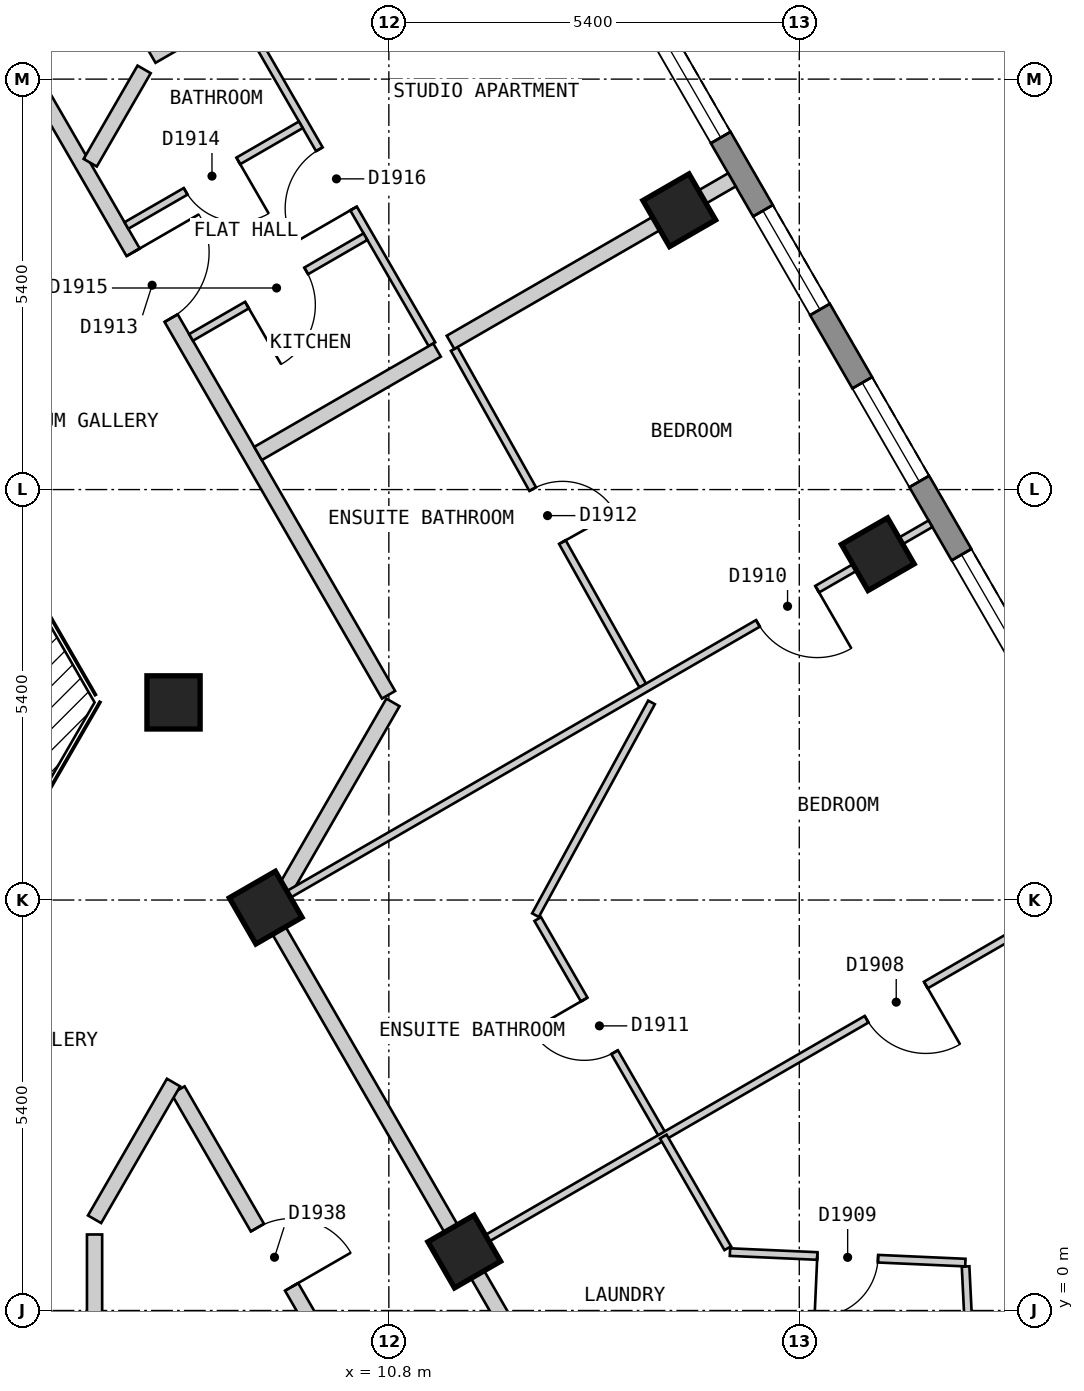
"""IFC4 building model, lengths in metres.
Left out: names, types, materials, properties, quantities, classifications, styles, units other than length and angle.
Written with IfcOpenShell. Run it as: python <this file> out.ifc"""

import sys

from ifc_helpers import new_model, si_unit, direction, frame, frame_2d, origin, origin_2d, place, context, subcontext, project, spatial, polyline, rectangle, outline, extrude, element, fill, save


model = new_model("IFC4")
c1 = context("Model", 3, precision=1e-05, world=origin(), true_north=direction((0.0, 1.0)))
c2 = subcontext(c1, "Body", "Model", "MODEL_VIEW")
j1 = project(units=[si_unit("LENGTHUNIT", "METRE"), si_unit("PLANEANGLEUNIT", "RADIAN")], contexts=[c1])
p1 = place(None, origin())
s1 = spatial("IfcSite", under=j1, at=p1, CompositionType="ELEMENT")
p2 = place(p1, origin())
s2 = spatial("IfcBuilding", under=s1, at=p2, CompositionType="ELEMENT")
p3 = place(p2, frame((0.0, 0.0, 220.8)))
s3 = spatial("IfcBuildingStorey", under=s2, at=p3, CompositionType="ELEMENT", Elevation=220.8)
for number, where, z_axis, x_axis in (
    (1, (17.233, 9.95, 0.0), (0.0, 0.0, 1.0), (-0.5, 0.866, 0.0)),
    (2, (14.621, 14.475, 0.0), (0.0, 0.0, 1.0), (-0.5, 0.866, 0.0)),
    (3, (11.792, 0.775, 0.0), (0.0, 0.0, 1.0), (-0.5, 0.866, 0.0)),
    (4, (9.179, 5.3, 0.0), (0.0, 0.0, 1.0), (-0.5, 0.866, 0.0)),
    (5, (7.967, 8.0, 0.0), (0.0, 0.0, 1.0), (1.0, 0.0, 0.0)),
):
    element("IfcColumn", number, at=place(p3, frame(where, z_axis=z_axis, x_axis=x_axis)), inside=s3, PredefinedType="COLUMN", context=c2, shape_type="SweptSolid", body=[
        extrude(rectangle(XDim=0.7, YDim=0.7, at=origin_2d()), origin(), (0.0, 0.0, 1.0), 3.0),
    ])
p4 = place(p3, frame((23.599, 0.825, 0.0), z_axis=(0.0, 0.0, 1.0), x_axis=(-0.500003656944, 0.866023292436, 0.0)))
e6 = element("IfcWall", 6, at=p4, inside=s3, PredefinedType="SOLIDWALL", context=c2, shape_type="SweptSolid", body=[
    extrude(outline(polyline([(0.0, -0.15), (22.17, -0.15), (22.09, 0.15), (0.08, 0.15), (0.0, -0.15)])), origin(), (0.0, 0.0, 1.0), 2.7),
])
p5 = place(p4, frame((1.191, 0.0, 0.15)))
e7 = element("IfcOpeningElement", 7, at=p5, cuts=e6, PredefinedType="OPENING", context=c2, shape_type="SweptSolid", body=[
    extrude(rectangle(XDim=1.5, YDim=2.1, at=frame_2d((0.75, 1.05))), frame((0.0, 0.16, 0.0), z_axis=(0.0, -1.0, 0.0), x_axis=(1.0, 0.0, 0.0)), (0.0, 0.0, 1.0), 0.32),
])
p6 = place(p4, frame((3.804, 0.0, 0.15)))
e8 = element("IfcOpeningElement", 8, at=p6, cuts=e6, PredefinedType="OPENING", context=c2, shape_type="SweptSolid", body=[
    extrude(rectangle(XDim=1.5, YDim=2.1, at=frame_2d((0.75, 1.05))), frame((0.0, 0.16, 0.0), z_axis=(0.0, -1.0, 0.0), x_axis=(1.0, 0.0, 0.0)), (0.0, 0.0, 1.0), 0.32),
])
p7 = place(p4, frame((6.417, 0.0, 0.15)))
e9 = element("IfcOpeningElement", 9, at=p7, cuts=e6, PredefinedType="OPENING", context=c2, shape_type="SweptSolid", body=[
    extrude(rectangle(XDim=1.5, YDim=2.1, at=frame_2d((0.75, 1.05))), frame((0.0, 0.16, 0.0), z_axis=(0.0, -1.0, 0.0), x_axis=(1.0, 0.0, 0.0)), (0.0, 0.0, 1.0), 0.32),
])
p8 = place(p4, frame((9.029, 0.0, 0.15)))
e10 = element("IfcOpeningElement", 10, at=p8, cuts=e6, PredefinedType="OPENING", context=c2, shape_type="SweptSolid", body=[
    extrude(rectangle(XDim=1.5, YDim=2.1, at=frame_2d((0.75, 1.05))), frame((0.0, 0.16, 0.0), z_axis=(0.0, -1.0, 0.0), x_axis=(1.0, 0.0, 0.0)), (0.0, 0.0, 1.0), 0.32),
])
p9 = place(p4, frame((11.641, 0.0, 0.15)))
e11 = element("IfcOpeningElement", 11, at=p9, cuts=e6, PredefinedType="OPENING", context=c2, shape_type="SweptSolid", body=[
    extrude(rectangle(XDim=1.5, YDim=2.1, at=frame_2d((0.75, 1.05))), frame((0.0, 0.16, 0.0), z_axis=(0.0, -1.0, 0.0), x_axis=(1.0, 0.0, 0.0)), (0.0, 0.0, 1.0), 0.32),
])
p10 = place(p4, frame((14.254, 0.0, 0.15)))
e12 = element("IfcOpeningElement", 12, at=p10, cuts=e6, PredefinedType="OPENING", context=c2, shape_type="SweptSolid", body=[
    extrude(rectangle(XDim=1.5, YDim=2.1, at=frame_2d((0.75, 1.05))), frame((0.0, 0.16, 0.0), z_axis=(0.0, -1.0, 0.0), x_axis=(1.0, 0.0, 0.0)), (0.0, 0.0, 1.0), 0.32),
])
p11 = place(p4, frame((16.866, 0.0, 0.15)))
e13 = element("IfcOpeningElement", 13, at=p11, cuts=e6, PredefinedType="OPENING", context=c2, shape_type="SweptSolid", body=[
    extrude(rectangle(XDim=1.5, YDim=2.1, at=frame_2d((0.75, 1.05))), frame((0.0, 0.16, 0.0), z_axis=(0.0, -1.0, 0.0), x_axis=(1.0, 0.0, 0.0)), (0.0, 0.0, 1.0), 0.32),
])
p12 = place(p4, frame((19.479, 0.0, 0.15)))
e14 = element("IfcOpeningElement", 14, at=p12, cuts=e6, PredefinedType="OPENING", context=c2, shape_type="SweptSolid", body=[
    extrude(rectangle(XDim=1.5, YDim=2.1, at=frame_2d((0.75, 1.05))), frame((0.0, 0.16, 0.0), z_axis=(0.0, -1.0, 0.0), x_axis=(1.0, 0.0, 0.0)), (0.0, 0.0, 1.0), 0.32),
])
p13 = place(p3, frame((8.026, 2.899, 0.0), z_axis=(0.0, 0.0, 1.0), x_axis=(0.499986018985, -0.866033475577, 0.0)))
e15 = element("IfcWall", 15, at=p13, inside=s3, PredefinedType="PARTITIONING", context=c2, shape_type="SweptSolid", body=[
    extrude(rectangle(XDim=5.078, YDim=0.2, at=frame_2d((2.539, 0.0))), origin(), (0.0, 0.0, 1.0), 2.7),
])
p14 = place(p13, frame((2.089, 0.0, 0.0)))
e16 = element("IfcOpeningElement", 16, at=p14, cuts=e15, PredefinedType="OPENING", context=c2, shape_type="SweptSolid", body=[
    extrude(rectangle(XDim=0.9, YDim=2.1, at=frame_2d((0.45, 1.05))), frame((0.0, 0.11, 0.0), z_axis=(0.0, -1.0, 0.0), x_axis=(1.0, 0.0, 0.0)), (0.0, 0.0, 1.0), 0.22),
])
p15 = place(p3, frame((9.238, 5.2, 0.0), z_axis=(0.0, 0.0, 1.0), x_axis=(0.500025705601, -0.86601056214, 0.0)))
e17 = element("IfcWall", 17, at=p15, inside=s3, PredefinedType="PARTITIONING", context=c2, shape_type="SweptSolid", body=[
    extrude(rectangle(XDim=7.735, YDim=0.2, at=frame_2d((3.868, 0.0))), origin(), (0.0, 0.0, 1.0), 2.7),
])
p16 = place(p3, frame((5.485, 17.3, 0.0), z_axis=(0.0, 0.0, 1.0), x_axis=(0.499943285704, -0.866058145322, 0.0)))
e18 = element("IfcWall", 18, at=p16, inside=s3, PredefinedType="PARTITIONING", context=c2, shape_type="SweptSolid", body=[
    extrude(rectangle(XDim=10.623, YDim=0.2, at=frame_2d((5.312, 0.0))), origin(), (0.0, 0.0, 1.0), 2.7),
])
p17 = place(p16, frame((3.901, 0.0, 0.0)))
e19 = element("IfcOpeningElement", 19, at=p17, cuts=e18, PredefinedType="OPENING", context=c2, shape_type="SweptSolid", body=[
    extrude(rectangle(XDim=1.0, YDim=2.1, at=frame_2d((0.5, 1.05))), frame((0.0, 0.11, 0.0), z_axis=(0.0, -1.0, 0.0), x_axis=(1.0, 0.0, 0.0)), (0.0, 0.0, 1.0), 0.22),
])
p18 = place(p3, frame((6.928, 1.0, 0.0), z_axis=(0.0, 0.0, 1.0), x_axis=(0.0, -1.0, 0.0)))
e20 = element("IfcWall", 20, at=p18, inside=s3, PredefinedType="PARTITIONING", context=c2, shape_type="SweptSolid", body=[
    extrude(rectangle(XDim=3.699, YDim=0.2, at=frame_2d((1.85, 0.0))), origin(), (0.0, 0.0, 1.0), 2.7),
])
p19 = place(p3, frame((6.928, 1.2, 0.0), z_axis=(0.0, 0.0, 1.0), x_axis=(0.500132712588, 0.865948768577, 0.0)))
e21 = element("IfcWall", 21, at=p19, inside=s3, PredefinedType="PARTITIONING", context=c2, shape_type="SweptSolid", body=[
    extrude(rectangle(XDim=2.078, YDim=0.2, at=frame_2d((1.039, 0.0))), origin(), (0.0, 0.0, 1.0), 2.7),
])
p20 = place(p3, frame((9.404, 5.487, 0.0), z_axis=(0.0, 0.0, 1.0), x_axis=(0.499768590677, 0.866158966803, 0.0)))
e22 = element("IfcWall", 22, at=p20, inside=s3, PredefinedType="PARTITIONING", context=c2, shape_type="SweptSolid", body=[
    extrude(rectangle(XDim=2.901, YDim=0.2, at=frame_2d((1.451, 0.0))), origin(), (0.0, 0.0, 1.0), 2.7),
])
p21 = place(p3, frame((12.759, 5.15, 0.0), z_axis=(0.0, 0.0, 1.0), x_axis=(0.499905801698, -0.866079782369, 0.0)))
e23 = element("IfcWall", 23, at=p21, inside=s3, PredefinedType="PARTITIONING", context=c2, shape_type="SweptSolid", body=[
    extrude(rectangle(XDim=3.304, YDim=0.1, at=frame_2d((1.652, 0.0))), origin(), (0.0, 0.0, 1.0), 2.7),
])
p22 = place(p21, frame((1.223, 0.0, 0.0)))
e24 = element("IfcOpeningElement", 24, at=p22, cuts=e23, PredefinedType="OPENING", context=c2, shape_type="SweptSolid", body=[
    extrude(rectangle(XDim=0.8, YDim=2.1, at=frame_2d((0.4, 1.05))), frame((0.0, 0.06, 0.0), z_axis=(0.0, -1.0, 0.0), x_axis=(1.0, 0.0, 0.0)), (0.0, 0.0, 1.0), 0.12),
])
p23 = place(p3, frame((8.854, 17.064, 0.0), z_axis=(0.0, 0.0, 1.0), x_axis=(0.500042049778, -0.866001124973, 0.0)))
e25 = element("IfcWall", 25, at=p23, inside=s3, PredefinedType="PARTITIONING", context=c2, shape_type="SweptSolid", body=[
    extrude(rectangle(XDim=5.025, YDim=0.1, at=frame_2d((2.513, 0.0))), origin(), (0.0, 0.0, 1.0), 2.7),
])
p24 = place(p23, frame((2.063, 0.0, 0.0)))
e26 = element("IfcOpeningElement", 26, at=p24, cuts=e25, PredefinedType="OPENING", context=c2, shape_type="SweptSolid", body=[
    extrude(rectangle(XDim=0.9, YDim=2.1, at=frame_2d((0.45, 1.05))), frame((0.0, 0.06, 0.0), z_axis=(0.0, -1.0, 0.0), x_axis=(1.0, 0.0, 0.0)), (0.0, 0.0, 1.0), 0.12),
])
p25 = place(p3, frame((11.66, 12.65, 0.0), z_axis=(0.0, 0.0, 1.0), x_axis=(0.488650242737, -0.872479764965, 0.0)))
e27 = element("IfcWall", 27, at=p25, inside=s3, PredefinedType="PARTITIONING", context=c2, shape_type="SweptSolid", body=[
    extrude(rectangle(XDim=5.075, YDim=0.1, at=frame_2d((2.538, 0.0))), origin(), (0.0, 0.0, 1.0), 2.7),
])
p26 = place(p25, frame((2.113, 0.0, 0.0)))
e28 = element("IfcOpeningElement", 28, at=p26, cuts=e27, PredefinedType="OPENING", context=c2, shape_type="SweptSolid", body=[
    extrude(rectangle(XDim=0.8, YDim=2.1, at=frame_2d((0.4, 1.05))), frame((0.0, 0.06, 0.0), z_axis=(0.0, -1.0, 0.0), x_axis=(1.0, 0.0, 0.0)), (0.0, 0.0, 1.0), 0.12),
])
p27 = place(p3, frame((18.388, 0.579, 0.0), z_axis=(0.0, 0.0, 1.0), x_axis=(0.049097293833, -0.998794000652, 0.0)))
e29 = element("IfcWall", 29, at=p27, inside=s3, PredefinedType="PARTITIONING", context=c2, shape_type="SweptSolid", body=[
    extrude(rectangle(XDim=2.362, YDim=0.1, at=frame_2d((1.181, 0.0))), origin(), (0.0, 0.0, 1.0), 2.7),
])
p28 = place(p3, frame((15.288, 0.768, 0.0), z_axis=(0.0, 0.0, 1.0), x_axis=(0.999006028269, -0.044575278833, 0.0)))
e30 = element("IfcWall", 30, at=p28, inside=s3, PredefinedType="PARTITIONING", context=c2, shape_type="SweptSolid", body=[
    extrude(rectangle(XDim=3.1, YDim=0.1, at=frame_2d((1.55, 0.0))), origin(), (0.0, 0.0, 1.0), 2.7),
])
p29 = place(p28, frame((1.15, 0.0, 0.0)))
e31 = element("IfcOpeningElement", 31, at=p29, cuts=e30, PredefinedType="OPENING", context=c2, shape_type="SweptSolid", body=[
    extrude(rectangle(XDim=0.8, YDim=2.1, at=frame_2d((0.4, 1.05))), frame((0.0, 0.06, 0.0), z_axis=(0.0, -1.0, 0.0), x_axis=(1.0, 0.0, 0.0)), (0.0, 0.0, 1.0), 0.12),
])
p30 = place(p3, frame((12.729, 5.201, 0.0), z_axis=(0.0, 0.0, 1.0), x_axis=(0.478932598182, 0.877851676764, 0.0)))
e32 = element("IfcWall", 32, at=p30, inside=s3, PredefinedType="PARTITIONING", context=c2, shape_type="SweptSolid", body=[
    extrude(rectangle(XDim=3.188, YDim=0.1, at=frame_2d((1.594, 0.0))), origin(), (0.0, 0.0, 1.0), 2.7),
])
p31 = place(p3, frame((11.879, 0.826, 0.0), z_axis=(0.0, 0.0, 1.0), x_axis=(0.866065245018, 0.499930986609, 0.0)))
e33 = element("IfcWall", 33, at=p31, inside=s3, PredefinedType="PARTITIONING", context=c2, shape_type="SweptSolid", body=[
    extrude(rectangle(XDim=10.0, YDim=0.1, at=frame_2d((5.0, 0.0))), origin(), (0.0, 0.0, 1.0), 2.7),
])
p32 = place(p31, frame((6.012, 0.0, 0.0)))
e34 = element("IfcOpeningElement", 34, at=p32, cuts=e33, PredefinedType="OPENING", context=c2, shape_type="SweptSolid", body=[
    extrude(rectangle(XDim=0.9, YDim=2.1, at=frame_2d((0.45, 1.05))), frame((0.0, 0.06, 0.0), z_axis=(0.0, -1.0, 0.0), x_axis=(1.0, 0.0, 0.0)), (0.0, 0.0, 1.0), 0.12),
])
p33 = place(p3, frame((9.354, 5.401, 0.0), z_axis=(0.0, 0.0, 1.0), x_axis=(0.866018411306, 0.500012111133, 0.0)))
e35 = element("IfcWall", 35, at=p33, inside=s3, PredefinedType="PARTITIONING", context=c2, shape_type="SweptSolid", body=[
    extrude(rectangle(XDim=9.898, YDim=0.1, at=frame_2d((4.949, 0.0))), origin(), (0.0, 0.0, 1.0), 2.7),
])
p34 = place(p33, frame((7.277, 0.0, 0.0)))
e36 = element("IfcOpeningElement", 36, at=p34, cuts=e35, PredefinedType="OPENING", context=c2, shape_type="SweptSolid", body=[
    extrude(rectangle(XDim=0.9, YDim=2.1, at=frame_2d((0.45, 1.05))), frame((0.0, 0.06, 0.0), z_axis=(0.0, -1.0, 0.0), x_axis=(1.0, 0.0, 0.0)), (0.0, 0.0, 1.0), 0.12),
])
p35 = place(p3, frame((8.197, 12.802, 0.0), z_axis=(0.0, 0.0, 1.0), x_axis=(0.866029095148, 0.499993606316, 0.0)))
e37 = element("IfcWall", 37, at=p35, inside=s3, PredefinedType="PARTITIONING", context=c2, shape_type="SweptSolid", body=[
    extrude(rectangle(XDim=2.65, YDim=0.1, at=frame_2d((1.325, 0.0))), origin(), (0.0, 0.0, 1.0), 2.7),
])
p36 = place(p35, frame((0.85, 0.0, 0.0)))
e38 = element("IfcOpeningElement", 38, at=p36, cuts=e37, PredefinedType="OPENING", context=c2, shape_type="SweptSolid", body=[
    extrude(rectangle(XDim=0.9, YDim=2.1, at=frame_2d((0.45, 1.05))), frame((0.0, 0.06, 0.0), z_axis=(0.0, -1.0, 0.0), x_axis=(1.0, 0.0, 0.0)), (0.0, 0.0, 1.0), 0.12),
])
p37 = place(p3, frame((7.347, 14.274, 0.0), z_axis=(0.0, 0.0, 1.0), x_axis=(0.86601223543, 0.500022807565, 0.0)))
e39 = element("IfcWall", 39, at=p37, inside=s3, PredefinedType="PARTITIONING", context=c2, shape_type="SweptSolid", body=[
    extrude(rectangle(XDim=2.65, YDim=0.1, at=frame_2d((1.325, 0.0))), origin(), (0.0, 0.0, 1.0), 2.7),
])
p38 = place(p37, frame((0.9, 0.0, 0.0)))
e40 = element("IfcOpeningElement", 40, at=p38, cuts=e39, PredefinedType="OPENING", context=c2, shape_type="SweptSolid", body=[
    extrude(rectangle(XDim=0.8, YDim=2.1, at=frame_2d((0.4, 1.05))), frame((0.0, 0.06, 0.0), z_axis=(0.0, -1.0, 0.0), x_axis=(1.0, 0.0, 0.0)), (0.0, 0.0, 1.0), 0.12),
])
p39 = place(p3, frame((6.871, 15.1, 0.0), z_axis=(0.0, 0.0, 1.0), x_axis=(0.50006528296, 0.865987709369, 0.0)))
e41 = element("IfcWall", 41, at=p39, inside=s3, PredefinedType="PARTITIONING", context=c2, shape_type="SweptSolid", body=[
    extrude(rectangle(XDim=1.418, YDim=0.2, at=frame_2d((0.709, 0.0))), origin(), (0.0, 0.0, 1.0), 2.7),
])
p40 = place(p3, frame((9.079, 11.275, 0.0), z_axis=(0.0, 0.0, 1.0), x_axis=(0.865952340496, 0.500126527981, 0.0)))
e42 = element("IfcWall", 42, at=p40, inside=s3, PredefinedType="PARTITIONING", context=c2, shape_type="SweptSolid", body=[
    extrude(rectangle(XDim=2.719, YDim=0.2, at=frame_2d((1.36, 0.0))), origin(), (0.0, 0.0, 1.0), 2.7),
])
p41 = place(p3, frame((11.611, 12.737, 0.0), z_axis=(0.0, 0.0, 1.0), x_axis=(0.866017282483, 0.500014066243, 0.0)))
e43 = element("IfcWall", 43, at=p41, inside=s3, PredefinedType="PARTITIONING", context=c2, shape_type="SweptSolid", body=[
    extrude(rectangle(XDim=4.276, YDim=0.2, at=frame_2d((2.138, 0.0))), origin(), (0.0, 0.0, 1.0), 2.7),
])
p42 = place(p3, frame((7.68, 16.501, 0.0), z_axis=(0.0, 0.0, 1.0), x_axis=(0.86602149507, 0.500006770031, 0.0)))
e44 = element("IfcWall", 44, at=p42, inside=s3, PredefinedType="PARTITIONING", context=c2, shape_type="SweptSolid", body=[
    extrude(rectangle(XDim=5.798, YDim=0.2, at=frame_2d((2.899, 0.0))), origin(), (0.0, 0.0, 1.0), 2.7),
])
p43 = place(p3, frame((14.411, 2.288, 0.0), z_axis=(0.0, 0.0, 1.0), x_axis=(0.500009005995, -0.866020204108, 0.0)))
e45 = element("IfcWall", 45, at=p43, inside=s3, PredefinedType="PARTITIONING", context=c2, shape_type="SweptSolid", body=[
    extrude(rectangle(XDim=1.696, YDim=0.1, at=frame_2d((0.848, 0.0))), origin(), (0.0, 0.0, 1.0), 2.7),
])
p44 = place(p8, origin())
e46 = element("IfcWindow", 46, at=p44, inside=s3, PartitioningType="SINGLE_PANEL", PredefinedType="WINDOW", context=c2, shape_type="SweptSolid", body=[
    extrude(rectangle(XDim=1.5, YDim=2.1, at=frame_2d((0.75, 1.05))), frame((0.0, 0.03, 0.0), z_axis=(0.0, -1.0, 0.0), x_axis=(1.0, 0.0, 0.0)), (0.0, 0.0, 1.0), 0.06),
])
fill(e10, e46)
p45 = place(p9, origin())
e47 = element("IfcWindow", 47, at=p45, inside=s3, PartitioningType="SINGLE_PANEL", PredefinedType="WINDOW", context=c2, shape_type="SweptSolid", body=[
    extrude(rectangle(XDim=1.5, YDim=2.1, at=frame_2d((0.75, 1.05))), frame((0.0, 0.03, 0.0), z_axis=(0.0, -1.0, 0.0), x_axis=(1.0, 0.0, 0.0)), (0.0, 0.0, 1.0), 0.06),
])
fill(e11, e47)
p46 = place(p10, origin())
e48 = element("IfcWindow", 48, at=p46, inside=s3, PartitioningType="SINGLE_PANEL", PredefinedType="WINDOW", context=c2, shape_type="SweptSolid", body=[
    extrude(rectangle(XDim=1.5, YDim=2.1, at=frame_2d((0.75, 1.05))), frame((0.0, 0.03, 0.0), z_axis=(0.0, -1.0, 0.0), x_axis=(1.0, 0.0, 0.0)), (0.0, 0.0, 1.0), 0.06),
])
fill(e12, e48)
p47 = place(p11, origin())
e49 = element("IfcWindow", 49, at=p47, inside=s3, PartitioningType="SINGLE_PANEL", PredefinedType="WINDOW", context=c2, shape_type="SweptSolid", body=[
    extrude(rectangle(XDim=1.5, YDim=2.1, at=frame_2d((0.75, 1.05))), frame((0.0, 0.03, 0.0), z_axis=(0.0, -1.0, 0.0), x_axis=(1.0, 0.0, 0.0)), (0.0, 0.0, 1.0), 0.06),
])
fill(e13, e49)
p48 = place(p32, origin())
e50 = element("IfcDoor", 50, at=p48, inside=s3, OperationType="SINGLE_SWING_RIGHT", PredefinedType="DOOR", context=c2, shape_type="SweptSolid", body=[
    extrude(rectangle(XDim=0.9, YDim=2.1, at=frame_2d((0.45, 1.05))), frame((0.0, 0.025, 0.0), z_axis=(0.0, -1.0, 0.0), x_axis=(1.0, 0.0, 0.0)), (0.0, 0.0, 1.0), 0.05),
])
fill(e34, e50)
p49 = place(p29, origin())
e51 = element("IfcDoor", 51, at=p49, inside=s3, OperationType="SINGLE_SWING_LEFT", PredefinedType="DOOR", context=c2, shape_type="SweptSolid", body=[
    extrude(rectangle(XDim=0.8, YDim=2.1, at=frame_2d((0.4, 1.05))), frame((0.0, 0.025, 0.0), z_axis=(0.0, -1.0, 0.0), x_axis=(1.0, 0.0, 0.0)), (0.0, 0.0, 1.0), 0.05),
])
fill(e31, e51)
p50 = place(p34, origin())
e52 = element("IfcDoor", 52, at=p50, inside=s3, OperationType="SINGLE_SWING_RIGHT", PredefinedType="DOOR", context=c2, shape_type="SweptSolid", body=[
    extrude(rectangle(XDim=0.9, YDim=2.1, at=frame_2d((0.45, 1.05))), frame((0.0, 0.025, 0.0), z_axis=(0.0, -1.0, 0.0), x_axis=(1.0, 0.0, 0.0)), (0.0, 0.0, 1.0), 0.05),
])
fill(e36, e52)
p51 = place(p22, origin())
e53 = element("IfcDoor", 53, at=p51, inside=s3, OperationType="SINGLE_SWING_LEFT", PredefinedType="DOOR", context=c2, shape_type="SweptSolid", body=[
    extrude(rectangle(XDim=0.8, YDim=2.1, at=frame_2d((0.4, 1.05))), frame((0.0, 0.025, 0.0), z_axis=(0.0, -1.0, 0.0), x_axis=(1.0, 0.0, 0.0)), (0.0, 0.0, 1.0), 0.05),
])
fill(e24, e53)
p52 = place(p26, origin())
e54 = element("IfcDoor", 54, at=p52, inside=s3, OperationType="SINGLE_SWING_RIGHT", PredefinedType="DOOR", context=c2, shape_type="SweptSolid", body=[
    extrude(rectangle(XDim=0.8, YDim=2.1, at=frame_2d((0.4, 1.05))), frame((0.0, 0.025, 0.0), z_axis=(0.0, -1.0, 0.0), x_axis=(1.0, 0.0, 0.0)), (0.0, 0.0, 1.0), 0.05),
])
fill(e28, e54)
p53 = place(p17, origin())
e55 = element("IfcDoor", 55, at=p53, inside=s3, OperationType="SINGLE_SWING_LEFT", PredefinedType="DOOR", context=c2, shape_type="SweptSolid", body=[
    extrude(rectangle(XDim=1.0, YDim=2.1, at=frame_2d((0.5, 1.05))), frame((0.0, 0.025, 0.0), z_axis=(0.0, -1.0, 0.0), x_axis=(1.0, 0.0, 0.0)), (0.0, 0.0, 1.0), 0.05),
])
fill(e19, e55)
p54 = place(p38, origin())
e56 = element("IfcDoor", 56, at=p54, inside=s3, OperationType="SINGLE_SWING_RIGHT", PredefinedType="DOOR", context=c2, shape_type="SweptSolid", body=[
    extrude(rectangle(XDim=0.8, YDim=2.1, at=frame_2d((0.4, 1.05))), frame((0.0, 0.025, 0.0), z_axis=(0.0, -1.0, 0.0), x_axis=(1.0, 0.0, 0.0)), (0.0, 0.0, 1.0), 0.05),
])
fill(e40, e56)
p55 = place(p36, origin())
e57 = element("IfcDoor", 57, at=p55, inside=s3, OperationType="SINGLE_SWING_LEFT", PredefinedType="DOOR", context=c2, shape_type="SweptSolid", body=[
    extrude(rectangle(XDim=0.9, YDim=2.1, at=frame_2d((0.45, 1.05))), frame((0.0, 0.025, 0.0), z_axis=(0.0, -1.0, 0.0), x_axis=(1.0, 0.0, 0.0)), (0.0, 0.0, 1.0), 0.05),
])
fill(e38, e57)
p56 = place(p24, origin())
e58 = element("IfcDoor", 58, at=p56, inside=s3, OperationType="SINGLE_SWING_RIGHT", PredefinedType="DOOR", context=c2, shape_type="SweptSolid", body=[
    extrude(rectangle(XDim=0.9, YDim=2.1, at=frame_2d((0.45, 1.05))), frame((0.0, 0.025, 0.0), z_axis=(0.0, -1.0, 0.0), x_axis=(1.0, 0.0, 0.0)), (0.0, 0.0, 1.0), 0.05),
])
fill(e26, e58)
p57 = place(p14, origin())
e59 = element("IfcDoor", 59, at=p57, inside=s3, OperationType="SINGLE_SWING_RIGHT", PredefinedType="DOOR", context=c2, shape_type="SweptSolid", body=[
    extrude(rectangle(XDim=0.9, YDim=2.1, at=frame_2d((0.45, 1.05))), frame((0.0, 0.025, 0.0), z_axis=(0.0, -1.0, 0.0), x_axis=(1.0, 0.0, 0.0)), (0.0, 0.0, 1.0), 0.05),
])
fill(e16, e59)
save(model, sys.argv[1])
